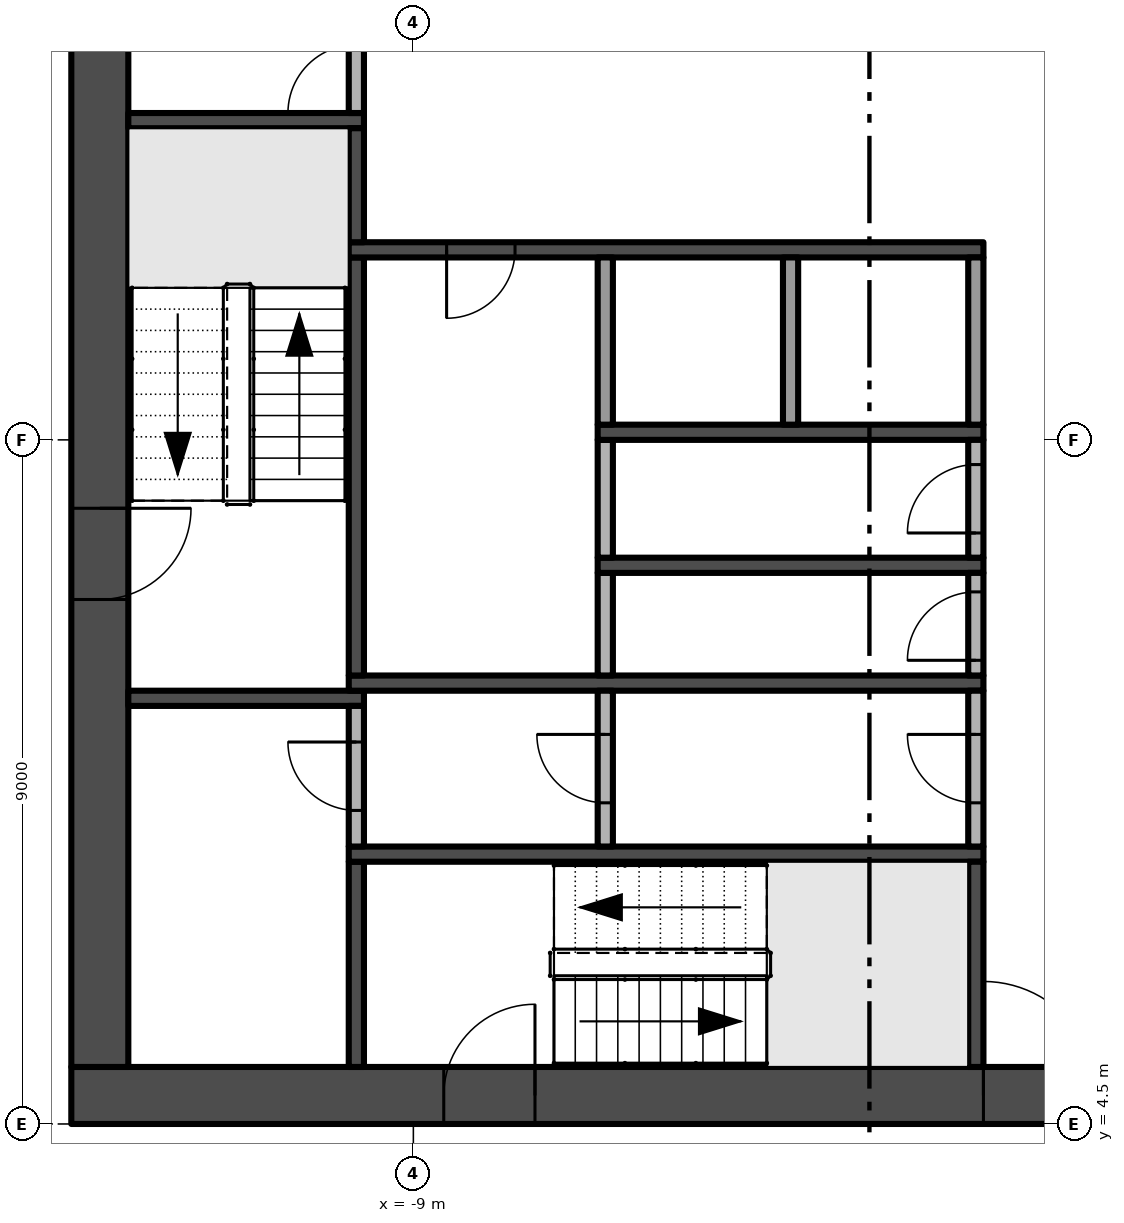
"""IFC4 building model, lengths in metres.
Left out: names, types, materials, properties, quantities, classifications, styles, units other than length and angle.
Written with IfcOpenShell. Run it as: python <this file> out.ifc"""

import sys

from ifc_helpers import new_model, si_unit, direction, frame, frame_2d, origin, place, context, subcontext, project, spatial, rectangle, extrude, element, fill, save


model = new_model("IFC4")
c1 = context("Model", 3, precision=1e-05, world=origin(), true_north=direction((0.0, 1.0)))
c2 = subcontext(c1, "Body", "Model", "MODEL_VIEW")
j1 = project(units=[si_unit("LENGTHUNIT", "METRE"), si_unit("PLANEANGLEUNIT", "RADIAN")], contexts=[c1])
p1 = place(None, origin())
s1 = spatial("IfcSite", under=j1, at=p1, CompositionType="ELEMENT")
p2 = place(p1, origin())
s2 = spatial("IfcBuilding", under=s1, at=p2, CompositionType="ELEMENT")
p3 = place(p2, frame((0.0, 0.0, 166.8)))
s3 = spatial("IfcBuildingStorey", under=s2, at=p3, CompositionType="ELEMENT", Elevation=166.8)
p4 = place(p3, frame((-13.5, 4.875, -0.3), z_axis=(0.0, 0.0, 1.0), x_axis=(1.0, 0.0, 0.0)))
e1 = element("IfcWall", 1, at=p4, inside=s3, PredefinedType="SHEAR", context=c2, shape_type="SweptSolid", body=[
    extrude(rectangle(XDim=27.0, YDim=0.75, at=frame_2d((13.5, 0.0))), origin(), (0.0, 0.0, 1.0), 3.8),
])
p5 = place(p4, frame((12.0, 0.0, 0.3)))
e2 = element("IfcOpeningElement", 2, at=p5, cuts=e1, PredefinedType="OPENING", context=c2, shape_type="SweptSolid", body=[
    extrude(rectangle(XDim=3.0, YDim=2.4, at=frame_2d((1.5, 1.2))), frame((0.0, 0.385, 0.0), z_axis=(0.0, -1.0, 0.0), x_axis=(1.0, 0.0, 0.0)), (0.0, 0.0, 1.0), 0.77),
])
p6 = place(p4, frame((4.9, 0.0, 0.3)))
e3 = element("IfcOpeningElement", 3, at=p6, cuts=e1, PredefinedType="OPENING", context=c2, shape_type="SweptSolid", body=[
    extrude(rectangle(XDim=1.2, YDim=2.2, at=frame_2d((0.6, 1.1))), frame((0.0, 0.385, 0.0), z_axis=(0.0, -1.0, 0.0), x_axis=(1.0, 0.0, 0.0)), (0.0, 0.0, 1.0), 0.77),
])
p7 = place(p4, frame((20.75, 0.0, 0.3)))
e4 = element("IfcOpeningElement", 4, at=p7, cuts=e1, PredefinedType="OPENING", context=c2, shape_type="SweptSolid", body=[
    extrude(rectangle(XDim=1.5, YDim=2.2, at=frame_2d((0.75, 1.1))), frame((0.0, 0.385, 0.0), z_axis=(0.0, -1.0, 0.0), x_axis=(1.0, 0.0, 0.0)), (0.0, 0.0, 1.0), 0.77),
])
p8 = place(p4, frame((17.4, 0.0, 0.3)))
e5 = element("IfcOpeningElement", 5, at=p8, cuts=e1, PredefinedType="OPENING", context=c2, shape_type="SweptSolid", body=[
    extrude(rectangle(XDim=1.2, YDim=2.2, at=frame_2d((0.6, 1.1))), frame((0.0, 0.385, 0.0), z_axis=(0.0, -1.0, 0.0), x_axis=(1.0, 0.0, 0.0)), (0.0, 0.0, 1.0), 0.77),
])
p9 = place(p3, frame((-13.125, 21.75, -0.3), z_axis=(0.0, 0.0, 1.0), x_axis=(0.0, -1.0, 0.0)))
e6 = element("IfcWall", 6, at=p9, inside=s3, PredefinedType="SHEAR", context=c2, shape_type="SweptSolid", body=[
    extrude(rectangle(XDim=16.5, YDim=0.75, at=frame_2d((8.25, 0.0))), origin(), (0.0, 0.0, 1.0), 3.8),
])
p10 = place(p9, frame((9.15, 0.0, 0.3)))
e7 = element("IfcOpeningElement", 7, at=p10, cuts=e6, PredefinedType="OPENING", context=c2, shape_type="SweptSolid", body=[
    extrude(rectangle(XDim=1.2, YDim=2.2, at=frame_2d((0.6, 1.1))), frame((0.0, 0.385, 0.0), z_axis=(0.0, -1.0, 0.0), x_axis=(1.0, 0.0, 0.0)), (0.0, 0.0, 1.0), 0.77),
])
for number, where, z_axis, x_axis in (
    (8, (-12.75, 10.1, 0.0), (0.0, 0.0, 1.0), (1.0, 0.0, 0.0)),
    (9, (-12.75, 17.7, 0.0), (0.0, 0.0, 1.0), (1.0, 0.0, 0.0)),
):
    element("IfcWall", number, at=place(p3, frame(where, z_axis=z_axis, x_axis=x_axis)), inside=s3, PredefinedType="SHEAR", context=c2, shape_type="SweptSolid", body=[
        extrude(rectangle(XDim=3.1, YDim=0.2, at=frame_2d((1.55, 0.0))), origin(), (0.0, 0.0, 1.0), 3.5),
    ])
p11 = place(p3, frame((-9.75, 5.25, 0.0), z_axis=(0.0, 0.0, 1.0), x_axis=(0.0, 1.0, 0.0)))
e10 = element("IfcWall", 10, at=p11, inside=s3, PredefinedType="SHEAR", context=c2, shape_type="SweptSolid", body=[
    extrude(rectangle(XDim=2.7, YDim=0.2, at=frame_2d((1.35, 0.0))), origin(), (0.0, 0.0, 1.0), 3.5),
])
p12 = place(p3, frame((-9.85, 8.05, 0.0), z_axis=(0.0, 0.0, 1.0), x_axis=(1.0, 0.0, 0.0)))
e11 = element("IfcWall", 11, at=p12, inside=s3, PredefinedType="SHEAR", context=c2, shape_type="SweptSolid", body=[
    extrude(rectangle(XDim=8.35, YDim=0.2, at=frame_2d((4.175, 0.0))), origin(), (0.0, 0.0, 1.0), 3.5),
])
p13 = place(p3, frame((-9.75, 8.15, 0.0), z_axis=(0.0, 0.0, 1.0), x_axis=(0.0, 1.0, 0.0)))
e12 = element("IfcWall", 12, at=p13, inside=s3, PredefinedType="PARTITIONING", context=c2, shape_type="SweptSolid", body=[
    extrude(rectangle(XDim=1.85, YDim=0.2, at=frame_2d((0.925, 0.0))), origin(), (0.0, 0.0, 1.0), 3.5),
])
p14 = place(p13, frame((0.475, 0.0, 0.0)))
e13 = element("IfcOpeningElement", 13, at=p14, cuts=e12, PredefinedType="OPENING", context=c2, shape_type="SweptSolid", body=[
    extrude(rectangle(XDim=0.9, YDim=2.1, at=frame_2d((0.45, 1.05))), frame((0.0, 0.11, 0.0), z_axis=(0.0, -1.0, 0.0), x_axis=(1.0, 0.0, 0.0)), (0.0, 0.0, 1.0), 0.22),
])
p15 = place(p3, frame((-9.85, 10.3, 0.0), z_axis=(0.0, 0.0, 1.0), x_axis=(1.0, 0.0, 0.0)))
e14 = element("IfcWall", 14, at=p15, inside=s3, PredefinedType="SHEAR", context=c2, shape_type="SweptSolid", body=[
    extrude(rectangle(XDim=8.35, YDim=0.2, at=frame_2d((4.175, 0.0))), origin(), (0.0, 0.0, 1.0), 3.5),
])
p16 = place(p3, frame((-9.75, 10.4, 0.0), z_axis=(0.0, 0.0, 1.0), x_axis=(0.0, 1.0, 0.0)))
e15 = element("IfcWall", 15, at=p16, inside=s3, PredefinedType="SHEAR", context=c2, shape_type="SweptSolid", body=[
    extrude(rectangle(XDim=5.5, YDim=0.2, at=frame_2d((2.75, 0.0))), origin(), (0.0, 0.0, 1.0), 3.5),
])
p17 = place(p3, frame((-1.5, 16.0, 0.0), z_axis=(0.0, 0.0, 1.0), x_axis=(-1.0, 0.0, 0.0)))
e16 = element("IfcWall", 16, at=p17, inside=s3, PredefinedType="SHEAR", context=c2, shape_type="SweptSolid", body=[
    extrude(rectangle(XDim=8.35, YDim=0.2, at=frame_2d((4.175, 0.0))), origin(), (0.0, 0.0, 1.0), 3.5),
])
p18 = place(p17, frame((6.162, 0.0, 0.0)))
e17 = element("IfcOpeningElement", 17, at=p18, cuts=e16, PredefinedType="OPENING", context=c2, shape_type="SweptSolid", body=[
    extrude(rectangle(XDim=0.9, YDim=2.1, at=frame_2d((0.45, 1.05))), frame((0.0, 0.11, 0.0), z_axis=(0.0, -1.0, 0.0), x_axis=(1.0, 0.0, 0.0)), (0.0, 0.0, 1.0), 0.22),
])
p19 = place(p3, frame((-9.75, 16.1, 0.0), z_axis=(0.0, 0.0, 1.0), x_axis=(0.0, 1.0, 0.0)))
e18 = element("IfcWall", 18, at=p19, inside=s3, PredefinedType="SHEAR", context=c2, shape_type="SweptSolid", body=[
    extrude(rectangle(XDim=1.5, YDim=0.2, at=frame_2d((0.75, 0.0))), origin(), (0.0, 0.0, 1.0), 3.5),
])
p20 = place(p3, frame((-9.75, 17.8, 0.0), z_axis=(0.0, 0.0, 1.0), x_axis=(0.0, 1.0, 0.0)))
e19 = element("IfcWall", 19, at=p20, inside=s3, PredefinedType="PARTITIONING", context=c2, shape_type="SweptSolid", body=[
    extrude(rectangle(XDim=1.4, YDim=0.2, at=frame_2d((0.7, 0.0))), origin(), (0.0, 0.0, 1.0), 3.5),
])
p21 = place(p20, origin())
e20 = element("IfcOpeningElement", 20, at=p21, cuts=e19, PredefinedType="OPENING", context=c2, shape_type="SweptSolid", body=[
    extrude(rectangle(XDim=0.9, YDim=2.1, at=frame_2d((0.45, 1.05))), frame((0.0, 0.11, 0.0), z_axis=(0.0, -1.0, 0.0), x_axis=(1.0, 0.0, 0.0)), (0.0, 0.0, 1.0), 0.22),
])
p22 = place(p3, frame((-6.475, 8.15, 0.0), z_axis=(0.0, 0.0, 1.0), x_axis=(0.0, 1.0, 0.0)))
e21 = element("IfcWall", 21, at=p22, inside=s3, PredefinedType="PARTITIONING", context=c2, shape_type="SweptSolid", body=[
    extrude(rectangle(XDim=2.05, YDim=0.2, at=frame_2d((1.025, 0.0))), origin(), (0.0, 0.0, 1.0), 3.5),
])
p23 = place(p22, frame((0.575, 0.0, 0.0)))
e22 = element("IfcOpeningElement", 22, at=p23, cuts=e21, PredefinedType="OPENING", context=c2, shape_type="SweptSolid", body=[
    extrude(rectangle(XDim=0.9, YDim=2.1, at=frame_2d((0.45, 1.05))), frame((0.0, 0.11, 0.0), z_axis=(0.0, -1.0, 0.0), x_axis=(1.0, 0.0, 0.0)), (0.0, 0.0, 1.0), 0.22),
])
p24 = place(p3, frame((-6.475, 10.4, 0.0), z_axis=(0.0, 0.0, 1.0), x_axis=(0.0, 1.0, 0.0)))
e23 = element("IfcWall", 23, at=p24, inside=s3, PredefinedType="PARTITIONING", context=c2, shape_type="SweptSolid", body=[
    extrude(rectangle(XDim=1.35, YDim=0.2, at=frame_2d((0.675, 0.0))), origin(), (0.0, 0.0, 1.0), 3.5),
])
p25 = place(p3, frame((-6.575, 11.85, 0.0), z_axis=(0.0, 0.0, 1.0), x_axis=(1.0, 0.0, 0.0)))
e24 = element("IfcWall", 24, at=p25, inside=s3, PredefinedType="SHEAR", context=c2, shape_type="SweptSolid", body=[
    extrude(rectangle(XDim=5.075, YDim=0.2, at=frame_2d((2.538, 0.0))), origin(), (0.0, 0.0, 1.0), 3.5),
])
p26 = place(p3, frame((-6.475, 11.95, 0.0), z_axis=(0.0, 0.0, 1.0), x_axis=(0.0, 1.0, 0.0)))
e25 = element("IfcWall", 25, at=p26, inside=s3, PredefinedType="PARTITIONING", context=c2, shape_type="SweptSolid", body=[
    extrude(rectangle(XDim=1.55, YDim=0.2, at=frame_2d((0.775, 0.0))), origin(), (0.0, 0.0, 1.0), 3.5),
])
p27 = place(p3, frame((-6.575, 13.6, 0.0), z_axis=(0.0, 0.0, 1.0), x_axis=(1.0, 0.0, 0.0)))
e26 = element("IfcWall", 26, at=p27, inside=s3, PredefinedType="SHEAR", context=c2, shape_type="SweptSolid", body=[
    extrude(rectangle(XDim=5.075, YDim=0.2, at=frame_2d((2.538, 0.0))), origin(), (0.0, 0.0, 1.0), 3.5),
])
for number, where, z_axis, x_axis in (
    (27, (-6.475, 13.7, 0.0), (0.0, 0.0, 1.0), (0.0, 1.0, 0.0)),
    (28, (-4.037, 13.7, 0.0), (0.0, 0.0, 1.0), (0.0, 1.0, 0.0)),
):
    element("IfcWall", number, at=place(p3, frame(where, z_axis=z_axis, x_axis=x_axis)), inside=s3, PredefinedType="PARTITIONING", context=c2, shape_type="SweptSolid", body=[
        extrude(rectangle(XDim=2.2, YDim=0.2, at=frame_2d((1.1, 0.0))), origin(), (0.0, 0.0, 1.0), 3.5),
    ])
p28 = place(p3, frame((-1.6, 5.25, 0.0), z_axis=(0.0, 0.0, 1.0), x_axis=(0.0, 1.0, 0.0)))
e29 = element("IfcWall", 29, at=p28, inside=s3, PredefinedType="SHEAR", context=c2, shape_type="SweptSolid", body=[
    extrude(rectangle(XDim=2.7, YDim=0.2, at=frame_2d((1.35, 0.0))), origin(), (0.0, 0.0, 1.0), 3.5),
])
p29 = place(p3, frame((-1.6, 8.15, 0.0), z_axis=(0.0, 0.0, 1.0), x_axis=(0.0, 1.0, 0.0)))
e30 = element("IfcWall", 30, at=p29, inside=s3, PredefinedType="PARTITIONING", context=c2, shape_type="SweptSolid", body=[
    extrude(rectangle(XDim=2.05, YDim=0.2, at=frame_2d((1.025, 0.0))), origin(), (0.0, 0.0, 1.0), 3.5),
])
p30 = place(p29, frame((0.575, 0.0, 0.0)))
e31 = element("IfcOpeningElement", 31, at=p30, cuts=e30, PredefinedType="OPENING", context=c2, shape_type="SweptSolid", body=[
    extrude(rectangle(XDim=0.9, YDim=2.1, at=frame_2d((0.45, 1.05))), frame((0.0, 0.11, 0.0), z_axis=(0.0, -1.0, 0.0), x_axis=(1.0, 0.0, 0.0)), (0.0, 0.0, 1.0), 0.22),
])
p31 = place(p3, frame((-1.6, 10.4, 0.0), z_axis=(0.0, 0.0, 1.0), x_axis=(0.0, 1.0, 0.0)))
e32 = element("IfcWall", 32, at=p31, inside=s3, PredefinedType="PARTITIONING", context=c2, shape_type="SweptSolid", body=[
    extrude(rectangle(XDim=1.35, YDim=0.2, at=frame_2d((0.675, 0.0))), origin(), (0.0, 0.0, 1.0), 3.5),
])
p32 = place(p31, frame((0.2, 0.0, 0.0)))
e33 = element("IfcOpeningElement", 33, at=p32, cuts=e32, PredefinedType="OPENING", context=c2, shape_type="SweptSolid", body=[
    extrude(rectangle(XDim=0.9, YDim=2.1, at=frame_2d((0.45, 1.05))), frame((0.0, 0.11, 0.0), z_axis=(0.0, -1.0, 0.0), x_axis=(1.0, 0.0, 0.0)), (0.0, 0.0, 1.0), 0.22),
])
p33 = place(p3, frame((-1.6, 11.95, 0.0), z_axis=(0.0, 0.0, 1.0), x_axis=(0.0, 1.0, 0.0)))
e34 = element("IfcWall", 34, at=p33, inside=s3, PredefinedType="PARTITIONING", context=c2, shape_type="SweptSolid", body=[
    extrude(rectangle(XDim=1.55, YDim=0.2, at=frame_2d((0.775, 0.0))), origin(), (0.0, 0.0, 1.0), 3.5),
])
p34 = place(p33, frame((0.325, 0.0, 0.0)))
e35 = element("IfcOpeningElement", 35, at=p34, cuts=e34, PredefinedType="OPENING", context=c2, shape_type="SweptSolid", body=[
    extrude(rectangle(XDim=0.9, YDim=2.1, at=frame_2d((0.45, 1.05))), frame((0.0, 0.11, 0.0), z_axis=(0.0, -1.0, 0.0), x_axis=(1.0, 0.0, 0.0)), (0.0, 0.0, 1.0), 0.22),
])
p35 = place(p3, frame((-1.6, 13.7, 0.0), z_axis=(0.0, 0.0, 1.0), x_axis=(0.0, 1.0, 0.0)))
e36 = element("IfcWall", 36, at=p35, inside=s3, PredefinedType="PARTITIONING", context=c2, shape_type="SweptSolid", body=[
    extrude(rectangle(XDim=2.2, YDim=0.2, at=frame_2d((1.1, 0.0))), origin(), (0.0, 0.0, 1.0), 3.5),
])
p36 = place(p5, frame((3.0, 0.0, 0.0), z_axis=(0.0, 0.0, 1.0), x_axis=(-1.0, 0.0, 0.0)))
e37 = element("IfcDoor", 37, at=p36, inside=s3, OperationType="DOUBLE_DOOR_SINGLE_SWING", PredefinedType="DOOR", context=c2, shape_type="SweptSolid", body=[
    extrude(rectangle(XDim=3.0, YDim=2.4, at=frame_2d((1.5, 1.2))), frame((0.0, 0.025, 0.0), z_axis=(0.0, -1.0, 0.0), x_axis=(1.0, 0.0, 0.0)), (0.0, 0.0, 1.0), 0.05),
])
fill(e2, e37)
p37 = place(p10, frame((1.2, 0.0, 0.0), z_axis=(0.0, 0.0, 1.0), x_axis=(-1.0, 0.0, 0.0)))
e38 = element("IfcDoor", 38, at=p37, inside=s3, OperationType="SINGLE_SWING_RIGHT", PredefinedType="DOOR", context=c2, shape_type="SweptSolid", body=[
    extrude(rectangle(XDim=1.2, YDim=2.2, at=frame_2d((0.6, 1.1))), frame((0.0, 0.025, 0.0), z_axis=(0.0, -1.0, 0.0), x_axis=(1.0, 0.0, 0.0)), (0.0, 0.0, 1.0), 0.05),
])
fill(e7, e38)
p38 = place(p6, frame((1.2, 0.0, 0.0), z_axis=(0.0, 0.0, 1.0), x_axis=(-1.0, 0.0, 0.0)))
e39 = element("IfcDoor", 39, at=p38, inside=s3, OperationType="SINGLE_SWING_LEFT", PredefinedType="DOOR", context=c2, shape_type="SweptSolid", body=[
    extrude(rectangle(XDim=1.2, YDim=2.2, at=frame_2d((0.6, 1.1))), frame((0.0, 0.025, 0.0), z_axis=(0.0, -1.0, 0.0), x_axis=(1.0, 0.0, 0.0)), (0.0, 0.0, 1.0), 0.05),
])
fill(e3, e39)
p39 = place(p18, origin())
e40 = element("IfcDoor", 40, at=p39, inside=s3, OperationType="SINGLE_SWING_RIGHT", PredefinedType="DOOR", context=c2, shape_type="SweptSolid", body=[
    extrude(rectangle(XDim=0.9, YDim=2.1, at=frame_2d((0.45, 1.05))), frame((0.0, 0.025, 0.0), z_axis=(0.0, -1.0, 0.0), x_axis=(1.0, 0.0, 0.0)), (0.0, 0.0, 1.0), 0.05),
])
fill(e17, e40)
p40 = place(p30, origin())
e41 = element("IfcDoor", 41, at=p40, inside=s3, OperationType="SINGLE_SWING_RIGHT", PredefinedType="DOOR", context=c2, shape_type="SweptSolid", body=[
    extrude(rectangle(XDim=0.9, YDim=2.1, at=frame_2d((0.45, 1.05))), frame((0.0, 0.025, 0.0), z_axis=(0.0, -1.0, 0.0), x_axis=(1.0, 0.0, 0.0)), (0.0, 0.0, 1.0), 0.05),
])
fill(e31, e41)
p41 = place(p32, origin())
e42 = element("IfcDoor", 42, at=p41, inside=s3, OperationType="SINGLE_SWING_LEFT", PredefinedType="DOOR", context=c2, shape_type="SweptSolid", body=[
    extrude(rectangle(XDim=0.9, YDim=2.1, at=frame_2d((0.45, 1.05))), frame((0.0, 0.025, 0.0), z_axis=(0.0, -1.0, 0.0), x_axis=(1.0, 0.0, 0.0)), (0.0, 0.0, 1.0), 0.05),
])
fill(e33, e42)
p42 = place(p34, origin())
e43 = element("IfcDoor", 43, at=p42, inside=s3, OperationType="SINGLE_SWING_LEFT", PredefinedType="DOOR", context=c2, shape_type="SweptSolid", body=[
    extrude(rectangle(XDim=0.9, YDim=2.1, at=frame_2d((0.45, 1.05))), frame((0.0, 0.025, 0.0), z_axis=(0.0, -1.0, 0.0), x_axis=(1.0, 0.0, 0.0)), (0.0, 0.0, 1.0), 0.05),
])
fill(e35, e43)
p43 = place(p21, origin())
e44 = element("IfcDoor", 44, at=p43, inside=s3, OperationType="SINGLE_SWING_LEFT", PredefinedType="DOOR", context=c2, shape_type="SweptSolid", body=[
    extrude(rectangle(XDim=0.9, YDim=2.1, at=frame_2d((0.45, 1.05))), frame((0.0, 0.025, 0.0), z_axis=(0.0, -1.0, 0.0), x_axis=(1.0, 0.0, 0.0)), (0.0, 0.0, 1.0), 0.05),
])
fill(e20, e44)
p44 = place(p23, origin())
e45 = element("IfcDoor", 45, at=p44, inside=s3, OperationType="SINGLE_SWING_RIGHT", PredefinedType="DOOR", context=c2, shape_type="SweptSolid", body=[
    extrude(rectangle(XDim=0.9, YDim=2.1, at=frame_2d((0.45, 1.05))), frame((0.0, 0.025, 0.0), z_axis=(0.0, -1.0, 0.0), x_axis=(1.0, 0.0, 0.0)), (0.0, 0.0, 1.0), 0.05),
])
fill(e22, e45)
p45 = place(p14, origin())
e46 = element("IfcDoor", 46, at=p45, inside=s3, OperationType="SINGLE_SWING_RIGHT", PredefinedType="DOOR", context=c2, shape_type="SweptSolid", body=[
    extrude(rectangle(XDim=0.9, YDim=2.1, at=frame_2d((0.45, 1.05))), frame((0.0, 0.025, 0.0), z_axis=(0.0, -1.0, 0.0), x_axis=(1.0, 0.0, 0.0)), (0.0, 0.0, 1.0), 0.05),
])
fill(e13, e46)
save(model, sys.argv[1])
